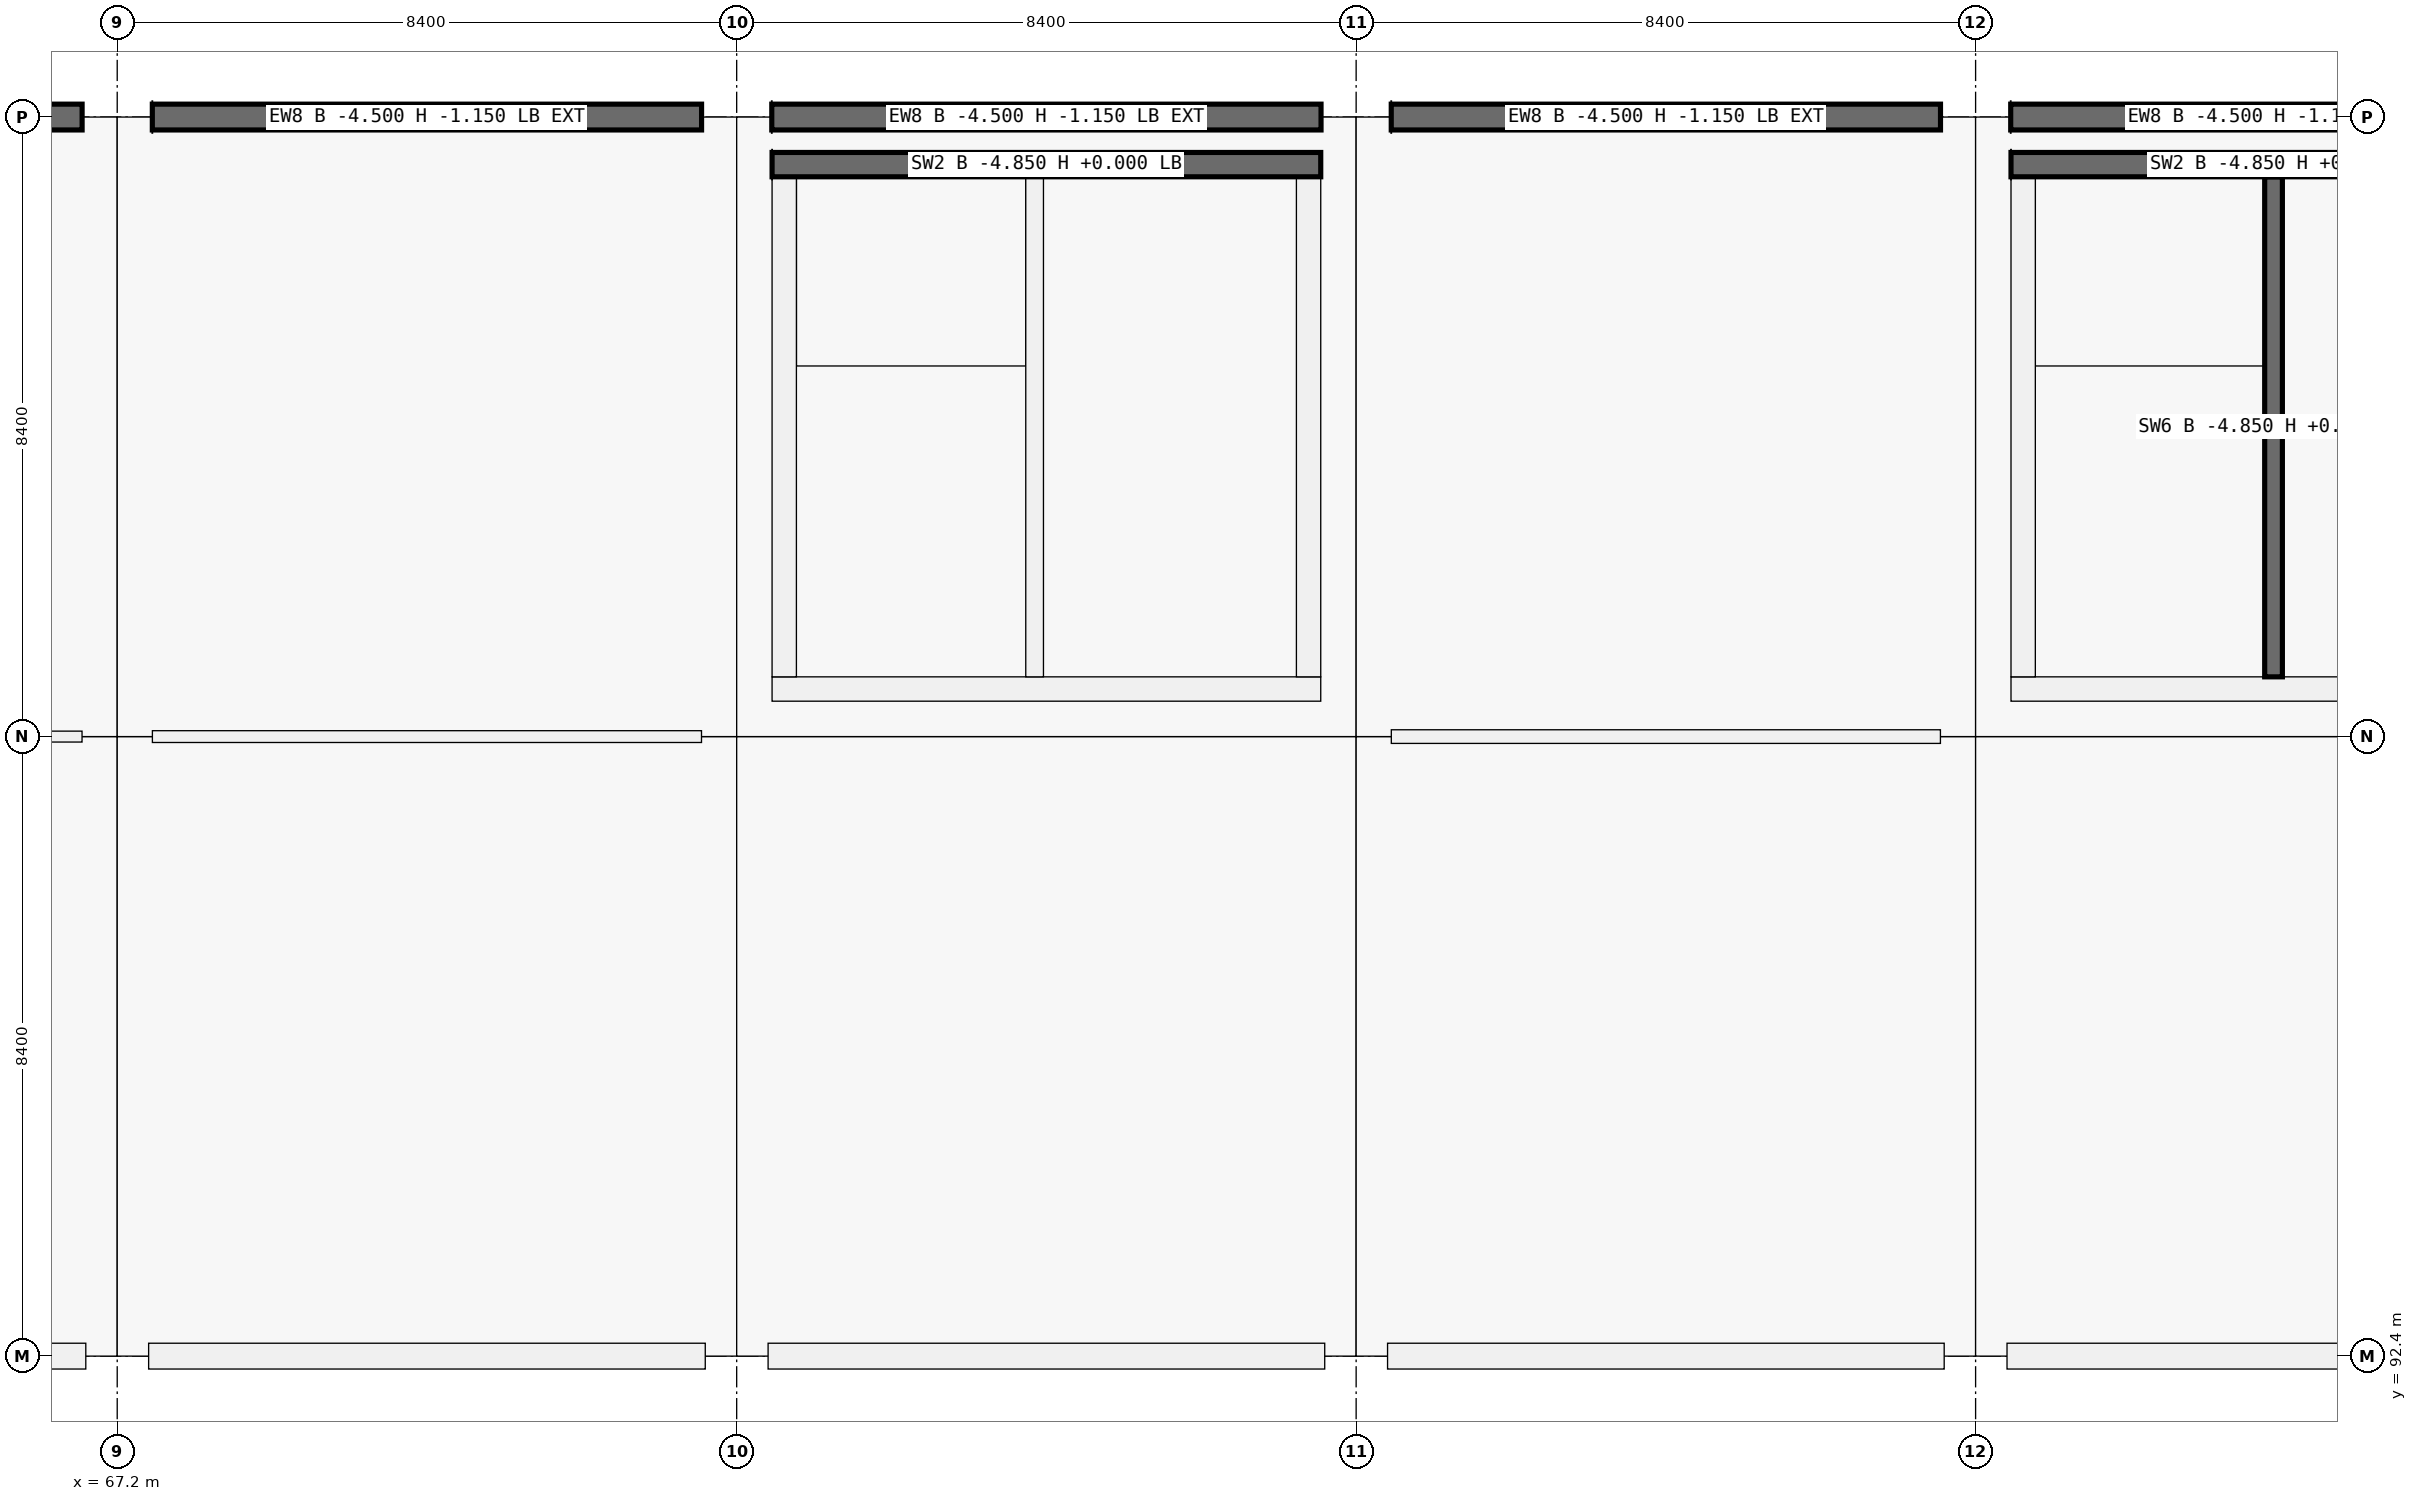
"""IFC4 building model, lengths in metres.
Left out: names, types, materials, properties, quantities, classifications, styles, units other than length and angle.
Written with IfcOpenShell. Run it as: python <this file> out.ifc"""

import sys

from ifc_helpers import new_model, si_unit, direction, frame, frame_2d, origin, origin_2d, place, context, subcontext, project, spatial, rectangle, extrude, element, fill, save


model = new_model("IFC4")
c1 = context("Model", 3, precision=1e-05, world=origin(), true_north=direction((0.0, 1.0)))
c2 = subcontext(c1, "Body", "Model", "MODEL_VIEW")
j1 = project(units=[si_unit("LENGTHUNIT", "METRE"), si_unit("PLANEANGLEUNIT", "RADIAN")], contexts=[c1])
p1 = place(None, origin())
s1 = spatial("IfcSite", under=j1, at=p1, CompositionType="ELEMENT")
p2 = place(p1, origin())
s2 = spatial("IfcBuilding", under=s1, at=p2, CompositionType="ELEMENT")
p3 = place(p2, frame((0.0, 0.0, -4.5)))
s3 = spatial("IfcBuildingStorey", under=s2, at=p3, CompositionType="ELEMENT", Elevation=-4.5)
p4 = place(p3, frame((67.2, 92.4, -0.35), z_axis=(0.0, 0.0, 1.0), x_axis=(1.0, 0.0, 0.0)))
e1 = element("IfcColumn", 1, at=p4, inside=s3, PredefinedType="COLUMN", context=c2, shape_type="SweptSolid", body=[
    extrude(rectangle(XDim=0.85, YDim=0.85, at=origin_2d()), origin(), (0.0, 0.0, 1.0), 4.5),
])
for number, where, z_axis, x_axis in (
    (2, (67.2, 100.8, -0.35), (0.0, 0.0, 1.0), (1.0, 0.0, 0.0)),
    (3, (67.2, 109.2, -0.35), (0.0, 0.0, 1.0), (1.0, 0.0, 0.0)),
):
    element("IfcColumn", number, at=place(p3, frame(where, z_axis=z_axis, x_axis=x_axis)), inside=s3, PredefinedType="COLUMN", context=c2, shape_type="SweptSolid", body=[
        extrude(rectangle(XDim=0.95, YDim=0.95, at=origin_2d()), origin(), (0.0, 0.0, 1.0), 4.85),
    ])
p5 = place(p3, frame((75.6, 92.4, -0.35), z_axis=(0.0, 0.0, 1.0), x_axis=(1.0, 0.0, 0.0)))
e4 = element("IfcColumn", 4, at=p5, inside=s3, PredefinedType="COLUMN", context=c2, shape_type="SweptSolid", body=[
    extrude(rectangle(XDim=0.85, YDim=0.85, at=origin_2d()), origin(), (0.0, 0.0, 1.0), 4.5),
])
for number, where, z_axis, x_axis in (
    (5, (75.6, 100.8, -0.35), (0.0, 0.0, 1.0), (1.0, 0.0, 0.0)),
    (6, (75.6, 109.2, -0.35), (0.0, 0.0, 1.0), (1.0, 0.0, 0.0)),
):
    element("IfcColumn", number, at=place(p3, frame(where, z_axis=z_axis, x_axis=x_axis)), inside=s3, PredefinedType="COLUMN", context=c2, shape_type="SweptSolid", body=[
        extrude(rectangle(XDim=0.95, YDim=0.95, at=origin_2d()), origin(), (0.0, 0.0, 1.0), 4.85),
    ])
p6 = place(p3, frame((84.0, 92.4, -0.35), z_axis=(0.0, 0.0, 1.0), x_axis=(1.0, 0.0, 0.0)))
e7 = element("IfcColumn", 7, at=p6, inside=s3, PredefinedType="COLUMN", context=c2, shape_type="SweptSolid", body=[
    extrude(rectangle(XDim=0.85, YDim=0.85, at=origin_2d()), origin(), (0.0, 0.0, 1.0), 4.5),
])
for number, where, z_axis, x_axis in (
    (8, (84.0, 100.8, -0.35), (0.0, 0.0, 1.0), (1.0, 0.0, 0.0)),
    (9, (84.0, 109.2, -0.35), (0.0, 0.0, 1.0), (1.0, 0.0, 0.0)),
):
    element("IfcColumn", number, at=place(p3, frame(where, z_axis=z_axis, x_axis=x_axis)), inside=s3, PredefinedType="COLUMN", context=c2, shape_type="SweptSolid", body=[
        extrude(rectangle(XDim=0.95, YDim=0.95, at=origin_2d()), origin(), (0.0, 0.0, 1.0), 4.85),
    ])
p7 = place(p3, frame((92.4, 92.4, -0.35), z_axis=(0.0, 0.0, 1.0), x_axis=(1.0, 0.0, 0.0)))
e10 = element("IfcColumn", 10, at=p7, inside=s3, PredefinedType="COLUMN", context=c2, shape_type="SweptSolid", body=[
    extrude(rectangle(XDim=0.85, YDim=0.85, at=origin_2d()), origin(), (0.0, 0.0, 1.0), 4.5),
])
for number, where, z_axis, x_axis in (
    (11, (92.4, 100.8, -0.35), (0.0, 0.0, 1.0), (1.0, 0.0, 0.0)),
    (12, (92.4, 109.2, -0.35), (0.0, 0.0, 1.0), (1.0, 0.0, 0.0)),
):
    element("IfcColumn", number, at=place(p3, frame(where, z_axis=z_axis, x_axis=x_axis)), inside=s3, PredefinedType="COLUMN", context=c2, shape_type="SweptSolid", body=[
        extrude(rectangle(XDim=0.95, YDim=0.95, at=origin_2d()), origin(), (0.0, 0.0, 1.0), 4.85),
    ])
p8 = place(p3, frame((66.774, 92.4, 0.0), z_axis=(0.0, 0.0, 1.0), x_axis=(-1.0, 0.0, 0.0)))
e13 = element("IfcWall", 13, at=p8, inside=s3, PredefinedType="SOLIDWALL", context=c2, shape_type="SweptSolid", body=[
    extrude(rectangle(XDim=7.498, YDim=0.35, at=frame_2d((3.749, 0.0))), origin(), (0.0, 0.0, 1.0), 3.35),
])
p9 = place(p3, frame((59.276, 109.2, 0.0), z_axis=(0.0, 0.0, 1.0), x_axis=(1.0, 0.0, 0.0)))
e14 = element("IfcWall", 14, at=p9, inside=s3, PredefinedType="SOLIDWALL", context=c2, shape_type="SweptSolid", body=[
    extrude(rectangle(XDim=7.448, YDim=0.35, at=frame_2d((3.724, 0.0))), origin(), (0.0, 0.0, 1.0), 3.35),
])
p10 = place(p3, frame((75.174, 92.4, 0.0), z_axis=(0.0, 0.0, 1.0), x_axis=(-1.0, 0.0, 0.0)))
e15 = element("IfcWall", 15, at=p10, inside=s3, PredefinedType="SOLIDWALL", context=c2, shape_type="SweptSolid", body=[
    extrude(rectangle(XDim=7.548, YDim=0.35, at=frame_2d((3.774, 0.0))), origin(), (0.0, 0.0, 1.0), 3.35),
])
p11 = place(p3, frame((67.676, 109.2, 0.0), z_axis=(0.0, 0.0, 1.0), x_axis=(1.0, 0.0, 0.0)))
e16 = element("IfcWall", 16, at=p11, inside=s3, PredefinedType="SOLIDWALL", context=c2, shape_type="SweptSolid", body=[
    extrude(rectangle(XDim=7.448, YDim=0.35, at=frame_2d((3.724, 0.0))), origin(), (0.0, 0.0, 1.0), 3.35),
])
p12 = place(p3, frame((83.574, 92.4, 0.0), z_axis=(0.0, 0.0, 1.0), x_axis=(-1.0, 0.0, 0.0)))
e17 = element("IfcWall", 17, at=p12, inside=s3, PredefinedType="SOLIDWALL", context=c2, shape_type="SweptSolid", body=[
    extrude(rectangle(XDim=7.548, YDim=0.35, at=frame_2d((3.774, 0.0))), origin(), (0.0, 0.0, 1.0), 3.35),
])
p13 = place(p3, frame((76.076, 109.2, 0.0), z_axis=(0.0, 0.0, 1.0), x_axis=(1.0, 0.0, 0.0)))
e18 = element("IfcWall", 18, at=p13, inside=s3, PredefinedType="SOLIDWALL", context=c2, shape_type="SweptSolid", body=[
    extrude(rectangle(XDim=7.448, YDim=0.35, at=frame_2d((3.724, 0.0))), origin(), (0.0, 0.0, 1.0), 3.35),
])
p14 = place(p3, frame((91.974, 92.4, 0.0), z_axis=(0.0, 0.0, 1.0), x_axis=(-1.0, 0.0, 0.0)))
e19 = element("IfcWall", 19, at=p14, inside=s3, PredefinedType="SOLIDWALL", context=c2, shape_type="SweptSolid", body=[
    extrude(rectangle(XDim=7.548, YDim=0.35, at=frame_2d((3.774, 0.0))), origin(), (0.0, 0.0, 1.0), 3.35),
])
p15 = place(p3, frame((84.476, 109.2, 0.0), z_axis=(0.0, 0.0, 1.0), x_axis=(1.0, 0.0, 0.0)))
e20 = element("IfcWall", 20, at=p15, inside=s3, PredefinedType="SOLIDWALL", context=c2, shape_type="SweptSolid", body=[
    extrude(rectangle(XDim=7.448, YDim=0.35, at=frame_2d((3.724, 0.0))), origin(), (0.0, 0.0, 1.0), 3.35),
])
p16 = place(p3, frame((100.374, 92.4, 0.0), z_axis=(0.0, 0.0, 1.0), x_axis=(-1.0, 0.0, 0.0)))
e21 = element("IfcWall", 21, at=p16, inside=s3, PredefinedType="SOLIDWALL", context=c2, shape_type="SweptSolid", body=[
    extrude(rectangle(XDim=7.548, YDim=0.35, at=frame_2d((3.774, 0.0))), origin(), (0.0, 0.0, 1.0), 3.35),
])
p17 = place(p3, frame((92.876, 109.2, 0.0), z_axis=(0.0, 0.0, 1.0), x_axis=(1.0, 0.0, 0.0)))
e22 = element("IfcWall", 22, at=p17, inside=s3, PredefinedType="SOLIDWALL", context=c2, shape_type="SweptSolid", body=[
    extrude(rectangle(XDim=7.448, YDim=0.35, at=frame_2d((3.724, 0.0))), origin(), (0.0, 0.0, 1.0), 3.35),
])
p18 = place(p3, frame((83.52, 101.445, -0.35), z_axis=(0.0, 0.0, 1.0), x_axis=(-1.0, 0.0, 0.0)))
e23 = element("IfcWall", 23, at=p18, inside=s3, PredefinedType="SHEAR", context=c2, shape_type="SweptSolid", body=[
    extrude(rectangle(XDim=7.44, YDim=0.33, at=frame_2d((3.72, 0.0))), origin(), (0.0, 0.0, 1.0), 4.85),
])
p19 = place(p18, frame((1.28, 0.0, 0.35)))
e24 = element("IfcOpeningElement", 24, at=p19, cuts=e23, PredefinedType="OPENING", context=c2, shape_type="SweptSolid", body=[
    extrude(rectangle(XDim=1.5, YDim=2.15, at=frame_2d((0.75, 1.075))), frame((0.0, 0.165, 0.0), z_axis=(0.0, -1.0, 0.0), x_axis=(1.0, 0.0, 0.0)), (0.0, 0.0, 1.0), 0.33),
])
p20 = place(p3, frame((76.245, 101.61, -0.35), z_axis=(0.0, 0.0, 1.0), x_axis=(0.0, 1.0, 0.0)))
e25 = element("IfcWall", 25, at=p20, inside=s3, PredefinedType="SHEAR", context=c2, shape_type="SweptSolid", body=[
    extrude(rectangle(XDim=6.78, YDim=0.33, at=frame_2d((3.39, 0.0))), origin(), (0.0, 0.0, 1.0), 4.85),
])
p21 = place(p3, frame((76.08, 108.555, -0.35), z_axis=(0.0, 0.0, 1.0), x_axis=(1.0, 0.0, 0.0)))
e26 = element("IfcWall", 26, at=p21, inside=s3, PredefinedType="SHEAR", context=c2, shape_type="SweptSolid", body=[
    extrude(rectangle(XDim=7.44, YDim=0.33, at=frame_2d((3.72, 0.0))), origin(), (0.0, 0.0, 1.0), 4.85),
])
p22 = place(p3, frame((83.355, 108.39, -0.35), z_axis=(0.0, 0.0, 1.0), x_axis=(0.0, -1.0, 0.0)))
e27 = element("IfcWall", 27, at=p22, inside=s3, PredefinedType="SHEAR", context=c2, shape_type="SweptSolid", body=[
    extrude(rectangle(XDim=6.78, YDim=0.33, at=frame_2d((3.39, 0.0))), origin(), (0.0, 0.0, 1.0), 4.85),
])
p23 = place(p22, frame((3.94, 0.0, 0.35)))
e28 = element("IfcOpeningElement", 28, at=p23, cuts=e27, PredefinedType="OPENING", context=c2, shape_type="SweptSolid", body=[
    extrude(rectangle(XDim=1.5, YDim=2.15, at=frame_2d((0.75, 1.075))), frame((0.0, 0.165, 0.0), z_axis=(0.0, -1.0, 0.0), x_axis=(1.0, 0.0, 0.0)), (0.0, 0.0, 1.0), 0.33),
])
p24 = place(p3, frame((79.64, 101.61, -0.35), z_axis=(0.0, 0.0, 1.0), x_axis=(0.0, 1.0, 0.0)))
e29 = element("IfcWall", 29, at=p24, inside=s3, PredefinedType="SHEAR", context=c2, shape_type="SweptSolid", body=[
    extrude(rectangle(XDim=6.78, YDim=0.24, at=frame_2d((3.39, 0.0))), origin(), (0.0, 0.0, 1.0), 4.85),
])
p25 = place(p24, frame((0.12, 0.0, 0.35)))
e30 = element("IfcOpeningElement", 30, at=p25, cuts=e29, PredefinedType="OPENING", context=c2, shape_type="SweptSolid", body=[
    extrude(rectangle(XDim=1.0, YDim=2.15, at=frame_2d((0.5, 1.075))), frame((0.0, 0.12, 0.0), z_axis=(0.0, -1.0, 0.0), x_axis=(1.0, 0.0, 0.0)), (0.0, 0.0, 1.0), 0.24),
])
p26 = place(p3, frame((100.32, 101.445, -0.35), z_axis=(0.0, 0.0, 1.0), x_axis=(-1.0, 0.0, 0.0)))
e31 = element("IfcWall", 31, at=p26, inside=s3, PredefinedType="SHEAR", context=c2, shape_type="SweptSolid", body=[
    extrude(rectangle(XDim=7.44, YDim=0.33, at=frame_2d((3.72, 0.0))), origin(), (0.0, 0.0, 1.0), 4.85),
])
p27 = place(p26, frame((1.28, 0.0, 0.35)))
e32 = element("IfcOpeningElement", 32, at=p27, cuts=e31, PredefinedType="OPENING", context=c2, shape_type="SweptSolid", body=[
    extrude(rectangle(XDim=1.5, YDim=2.15, at=frame_2d((0.75, 1.075))), frame((0.0, 0.165, 0.0), z_axis=(0.0, -1.0, 0.0), x_axis=(1.0, 0.0, 0.0)), (0.0, 0.0, 1.0), 0.33),
])
p28 = place(p3, frame((93.045, 101.61, -0.35), z_axis=(0.0, 0.0, 1.0), x_axis=(0.0, 1.0, 0.0)))
e33 = element("IfcWall", 33, at=p28, inside=s3, PredefinedType="SHEAR", context=c2, shape_type="SweptSolid", body=[
    extrude(rectangle(XDim=6.78, YDim=0.33, at=frame_2d((3.39, 0.0))), origin(), (0.0, 0.0, 1.0), 4.85),
])
p29 = place(p3, frame((92.88, 108.555, -0.35), z_axis=(0.0, 0.0, 1.0), x_axis=(1.0, 0.0, 0.0)))
e34 = element("IfcWall", 34, at=p29, inside=s3, PredefinedType="SHEAR", context=c2, shape_type="SweptSolid", body=[
    extrude(rectangle(XDim=7.44, YDim=0.33, at=frame_2d((3.72, 0.0))), origin(), (0.0, 0.0, 1.0), 4.85),
])
p30 = place(p3, frame((96.44, 101.61, -0.35), z_axis=(0.0, 0.0, 1.0), x_axis=(0.0, 1.0, 0.0)))
e35 = element("IfcWall", 35, at=p30, inside=s3, PredefinedType="SHEAR", context=c2, shape_type="SweptSolid", body=[
    extrude(rectangle(XDim=6.78, YDim=0.24, at=frame_2d((3.39, 0.0))), origin(), (0.0, 0.0, 1.0), 4.85),
])
p31 = place(p30, frame((0.12, 0.0, 0.35)))
e36 = element("IfcOpeningElement", 36, at=p31, cuts=e35, PredefinedType="OPENING", context=c2, shape_type="SweptSolid", body=[
    extrude(rectangle(XDim=1.0, YDim=2.15, at=frame_2d((0.5, 1.075))), frame((0.0, 0.12, 0.0), z_axis=(0.0, -1.0, 0.0), x_axis=(1.0, 0.0, 0.0)), (0.0, 0.0, 1.0), 0.24),
])
p32 = place(p3, frame((59.277, 100.8, 0.0), z_axis=(0.0, 0.0, 1.0), x_axis=(1.0, 0.0, 0.0)))
e37 = element("IfcWall", 37, at=p32, inside=s3, PredefinedType="PARTITIONING", context=c2, shape_type="SweptSolid", body=[
    extrude(rectangle(XDim=7.446, YDim=0.148, at=frame_2d((3.723, 0.0))), origin(), (0.0, 0.0, 1.0), 3.27),
])
p33 = place(p32, frame((3.198, 0.0, 0.0)))
e38 = element("IfcOpeningElement", 38, at=p33, cuts=e37, PredefinedType="OPENING", context=c2, shape_type="SweptSolid", body=[
    extrude(rectangle(XDim=1.05, YDim=2.15, at=frame_2d((0.525, 1.075))), frame((0.0, 0.074, 0.0), z_axis=(0.0, -1.0, 0.0), x_axis=(1.0, 0.0, 0.0)), (0.0, 0.0, 1.0), 0.148),
])
p34 = place(p3, frame((67.677, 100.8, 0.0), z_axis=(0.0, 0.0, 1.0), x_axis=(1.0, 0.0, 0.0)))
e39 = element("IfcWall", 39, at=p34, inside=s3, PredefinedType="PARTITIONING", context=c2, shape_type="SweptSolid", body=[
    extrude(rectangle(XDim=7.446, YDim=0.16, at=frame_2d((3.723, 0.0))), origin(), (0.0, 0.0, 1.0), 3.27),
])
p35 = place(p34, frame((3.223, 0.0, 0.0)))
e40 = element("IfcOpeningElement", 40, at=p35, cuts=e39, PredefinedType="OPENING", context=c2, shape_type="SweptSolid", body=[
    extrude(rectangle(XDim=1.0, YDim=2.15, at=frame_2d((0.5, 1.075))), frame((0.0, 0.08, 0.0), z_axis=(0.0, -1.0, 0.0), x_axis=(1.0, 0.0, 0.0)), (0.0, 0.0, 1.0), 0.16),
])
p36 = place(p3, frame((84.477, 100.8, 0.0), z_axis=(0.0, 0.0, 1.0), x_axis=(1.0, 0.0, 0.0)))
e41 = element("IfcWall", 41, at=p36, inside=s3, PredefinedType="PARTITIONING", context=c2, shape_type="SweptSolid", body=[
    extrude(rectangle(XDim=7.446, YDim=0.185, at=frame_2d((3.723, 0.0))), origin(), (0.0, 0.0, 1.0), 3.27),
])
p37 = place(p36, frame((3.218, 0.0, 0.0)))
e42 = element("IfcOpeningElement", 42, at=p37, cuts=e41, PredefinedType="OPENING", context=c2, shape_type="SweptSolid", body=[
    extrude(rectangle(XDim=1.01, YDim=2.12, at=frame_2d((0.505, 1.06))), frame((0.0, 0.093, 0.0), z_axis=(0.0, -1.0, 0.0), x_axis=(1.0, 0.0, 0.0)), (0.0, 0.0, 1.0), 0.185),
])
p38 = place(p25, origin())
e43 = element("IfcDoor", 43, at=p38, inside=s3, OperationType="SINGLE_SWING_RIGHT", PredefinedType="DOOR", context=c2, shape_type="SweptSolid", body=[
    extrude(rectangle(XDim=1.0, YDim=2.15, at=frame_2d((0.5, 1.075))), frame((0.0, 0.025, 0.0), z_axis=(0.0, -1.0, 0.0), x_axis=(1.0, 0.0, 0.0)), (0.0, 0.0, 1.0), 0.05),
])
fill(e30, e43)
p39 = place(p23, origin())
e44 = element("IfcDoor", 44, at=p39, inside=s3, OperationType="DOUBLE_DOOR_SINGLE_SWING", PredefinedType="DOOR", context=c2, shape_type="SweptSolid", body=[
    extrude(rectangle(XDim=1.5, YDim=2.15, at=frame_2d((0.75, 1.075))), frame((0.0, 0.025, 0.0), z_axis=(0.0, -1.0, 0.0), x_axis=(1.0, 0.0, 0.0)), (0.0, 0.0, 1.0), 0.05),
])
fill(e28, e44)
p40 = place(p19, origin())
e45 = element("IfcDoor", 45, at=p40, inside=s3, OperationType="DOUBLE_DOOR_SINGLE_SWING", PredefinedType="DOOR", context=c2, shape_type="SweptSolid", body=[
    extrude(rectangle(XDim=1.5, YDim=2.15, at=frame_2d((0.75, 1.075))), frame((0.0, 0.025, 0.0), z_axis=(0.0, -1.0, 0.0), x_axis=(1.0, 0.0, 0.0)), (0.0, 0.0, 1.0), 0.05),
])
fill(e24, e45)
p41 = place(p31, origin())
e46 = element("IfcDoor", 46, at=p41, inside=s3, OperationType="SINGLE_SWING_LEFT", PredefinedType="DOOR", context=c2, shape_type="SweptSolid", body=[
    extrude(rectangle(XDim=1.0, YDim=2.15, at=frame_2d((0.5, 1.075))), frame((0.0, 0.025, 0.0), z_axis=(0.0, -1.0, 0.0), x_axis=(1.0, 0.0, 0.0)), (0.0, 0.0, 1.0), 0.05),
])
fill(e36, e46)
p42 = place(p35, origin())
e47 = element("IfcDoor", 47, at=p42, inside=s3, OperationType="SINGLE_SWING_LEFT", PredefinedType="DOOR", context=c2, shape_type="SweptSolid", body=[
    extrude(rectangle(XDim=1.0, YDim=2.15, at=frame_2d((0.5, 1.075))), frame((0.0, 0.025, 0.0), z_axis=(0.0, -1.0, 0.0), x_axis=(1.0, 0.0, 0.0)), (0.0, 0.0, 1.0), 0.05),
])
fill(e40, e47)
p43 = place(p37, origin())
e48 = element("IfcDoor", 48, at=p43, inside=s3, OperationType="SINGLE_SWING_RIGHT", PredefinedType="DOOR", context=c2, shape_type="SweptSolid", body=[
    extrude(rectangle(XDim=1.01, YDim=2.12, at=frame_2d((0.505, 1.06))), frame((0.0, 0.025, 0.0), z_axis=(0.0, -1.0, 0.0), x_axis=(1.0, 0.0, 0.0)), (0.0, 0.0, 1.0), 0.05),
])
fill(e42, e48)
save(model, sys.argv[1])
